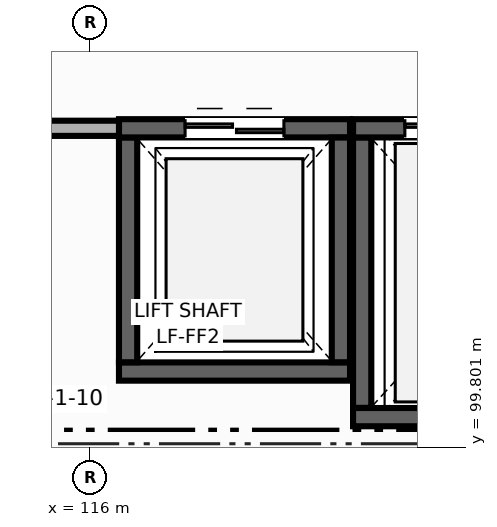
"""IFC4 building model, lengths in metres.
Left out: names, types, materials, properties, quantities, classifications, styles, units other than length and angle.
Written with IfcOpenShell. Run it as: python <this file> out.ifc"""

import sys

from ifc_helpers import new_model, si_unit, direction, frame, frame_2d, origin, place, context, subcontext, project, spatial, rectangle, extrude, element, fill, save


model = new_model("IFC4")
c1 = context("Model", 3, precision=1e-05, world=origin(), true_north=direction((0.0, 1.0)))
c2 = subcontext(c1, "Body", "Model", "MODEL_VIEW")
j1 = project(units=[si_unit("LENGTHUNIT", "METRE"), si_unit("PLANEANGLEUNIT", "RADIAN")], contexts=[c1])
p1 = place(None, origin())
s1 = spatial("IfcSite", under=j1, at=p1, CompositionType="ELEMENT")
p2 = place(p1, origin())
s2 = spatial("IfcBuilding", under=s1, at=p2, CompositionType="ELEMENT")
p3 = place(p2, origin())
s3 = spatial("IfcBuildingStorey", under=s2, at=p3, CompositionType="ELEMENT", Elevation=0.0)
p4 = place(p3, frame((119.42, 100.8, 0.0), z_axis=(0.0, 0.0, 1.0), x_axis=(-1.0, 0.0, 0.0)))
e1 = element("IfcWall", 1, at=p4, inside=s3, PredefinedType="SHEAR", context=c2, shape_type="SweptSolid", body=[
    extrude(rectangle(XDim=3.04, YDim=0.24, at=frame_2d((1.52, 0.0))), origin(), (0.0, 0.0, 1.0), 5.15),
])
p5 = place(p3, frame((116.5, 100.922, 0.0), z_axis=(0.0, 0.0, 1.0), x_axis=(0.0, 1.0, 0.0)))
e2 = element("IfcWall", 2, at=p5, inside=s3, PredefinedType="SHEAR", context=c2, shape_type="SweptSolid", body=[
    extrude(rectangle(XDim=2.958, YDim=0.24, at=frame_2d((1.479, 0.0))), origin(), (0.0, 0.0, 1.0), 5.15),
])
p6 = place(p3, frame((116.38, 104.0, 0.0), z_axis=(0.0, 0.0, 1.0), x_axis=(1.0, 0.0, 0.0)))
e3 = element("IfcWall", 3, at=p6, inside=s3, PredefinedType="SHEAR", context=c2, shape_type="SweptSolid", body=[
    extrude(rectangle(XDim=3.04, YDim=0.24, at=frame_2d((1.52, 0.0))), origin(), (0.0, 0.0, 1.0), 5.15),
])
p7 = place(p6, frame((0.87, 0.0, 0.0)))
e4 = element("IfcOpeningElement", 4, at=p7, cuts=e3, PredefinedType="OPENING", context=c2, shape_type="SweptSolid", body=[
    extrude(rectangle(XDim=1.3, YDim=2.15, at=frame_2d((0.65, 1.075))), frame((0.0, 0.13, 0.0), z_axis=(0.0, -1.0, 0.0), x_axis=(1.0, 0.0, 0.0)), (0.0, 0.0, 1.0), 0.26),
])
p8 = place(p3, frame((119.3, 103.878, 0.0), z_axis=(0.0, 0.0, 1.0), x_axis=(0.0, -1.0, 0.0)))
e5 = element("IfcWall", 5, at=p8, inside=s3, PredefinedType="SHEAR", context=c2, shape_type="SweptSolid", body=[
    extrude(rectangle(XDim=2.956, YDim=0.24, at=frame_2d((1.478, 0.0))), origin(), (0.0, 0.0, 1.0), 5.15),
])
p9 = place(p3, frame((123.023, 100.2, 0.0), z_axis=(0.0, 0.0, 1.0), x_axis=(-1.0, 0.0, 0.0)))
e6 = element("IfcWall", 6, at=p9, inside=s3, PredefinedType="SHEAR", context=c2, shape_type="SweptSolid", body=[
    extrude(rectangle(XDim=3.563, YDim=0.24, at=frame_2d((1.781, 0.0))), origin(), (0.0, 0.0, 1.0), 5.15),
])
p10 = place(p3, frame((119.58, 100.322, 0.0), z_axis=(0.0, 0.0, 1.0), x_axis=(0.0, 1.0, 0.0)))
e7 = element("IfcWall", 7, at=p10, inside=s3, PredefinedType="SHEAR", context=c2, shape_type="SweptSolid", body=[
    extrude(rectangle(XDim=3.558, YDim=0.24, at=frame_2d((1.779, 0.0))), origin(), (0.0, 0.0, 1.0), 5.15),
])
p11 = place(p3, frame((119.46, 104.0, 0.0), z_axis=(0.0, 0.0, 1.0), x_axis=(1.0, 0.0, 0.0)))
e8 = element("IfcWall", 8, at=p11, inside=s3, PredefinedType="SHEAR", context=c2, shape_type="SweptSolid", body=[
    extrude(rectangle(XDim=3.563, YDim=0.24, at=frame_2d((1.781, 0.0))), origin(), (0.0, 0.0, 1.0), 5.15),
])
p12 = place(p11, frame((0.681, 0.0, 0.0)))
e9 = element("IfcOpeningElement", 9, at=p12, cuts=e8, PredefinedType="OPENING", context=c2, shape_type="SweptSolid", body=[
    extrude(rectangle(XDim=2.2, YDim=2.5, at=frame_2d((1.1, 1.25))), frame((0.0, 0.13, 0.0), z_axis=(0.0, -1.0, 0.0), x_axis=(1.0, 0.0, 0.0)), (0.0, 0.0, 1.0), 0.26),
])
p13 = place(p3, frame((116.38, 104.0, 0.0), z_axis=(0.0, 0.0, 1.0), x_axis=(-1.0, 0.0, 0.0)))
e10 = element("IfcWall", 10, at=p13, inside=s3, PredefinedType="PARTITIONING", context=c2, shape_type="SweptSolid", body=[
    extrude(rectangle(XDim=1.88, YDim=0.2, at=frame_2d((0.94, 0.0))), origin(), (0.0, 0.0, 1.0), 5.15),
])
p14 = place(p7, origin())
e11 = element("IfcDoor", 11, at=p14, inside=s3, OperationType="DOUBLE_DOOR_SLIDING", PredefinedType="DOOR", context=c2, shape_type="SweptSolid", body=[
    extrude(rectangle(XDim=1.3, YDim=2.15, at=frame_2d((0.65, 1.075))), frame((0.0, 0.025, 0.0), z_axis=(0.0, -1.0, 0.0), x_axis=(1.0, 0.0, 0.0)), (0.0, 0.0, 1.0), 0.05),
])
fill(e4, e11)
p15 = place(p12, origin())
e12 = element("IfcDoor", 12, at=p15, inside=s3, OperationType="DOUBLE_DOOR_SLIDING", PredefinedType="DOOR", context=c2, shape_type="SweptSolid", body=[
    extrude(rectangle(XDim=2.2, YDim=2.5, at=frame_2d((1.1, 1.25))), frame((0.0, 0.025, 0.0), z_axis=(0.0, -1.0, 0.0), x_axis=(1.0, 0.0, 0.0)), (0.0, 0.0, 1.0), 0.05),
])
fill(e9, e12)
save(model, sys.argv[1])
